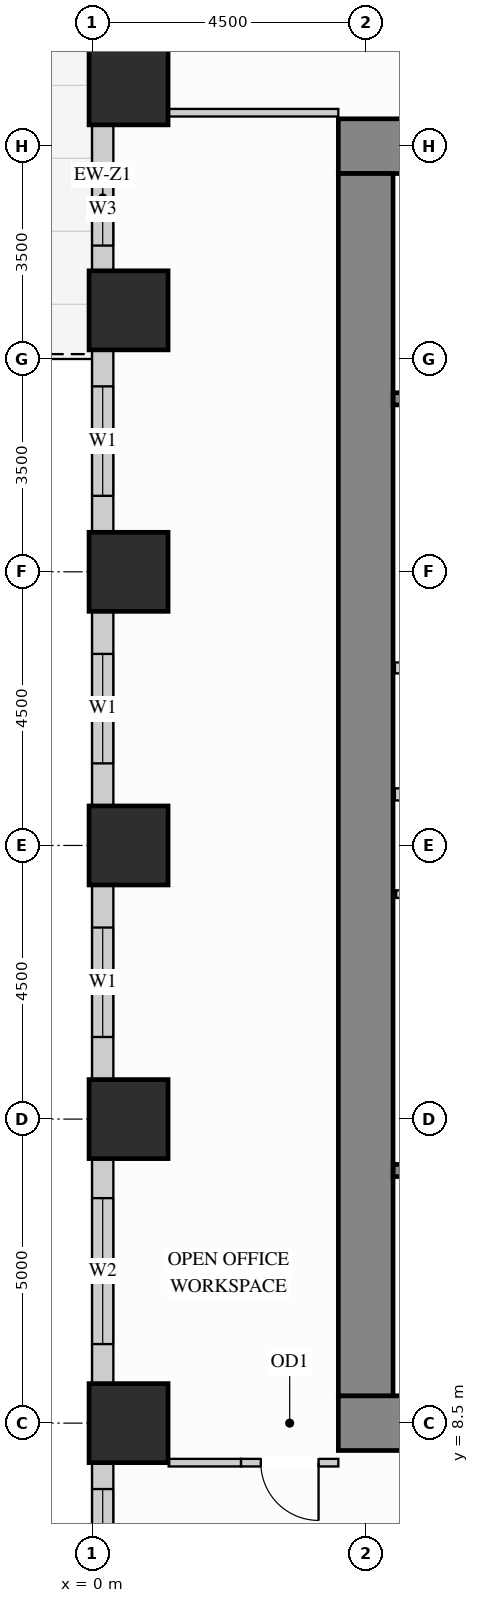
"""IFC4 building model, lengths in metres.
Left out: names, types, materials, properties, quantities, classifications, styles, units other than length and angle.
Written with IfcOpenShell. Run it as: python <this file> out.ifc"""

import sys

from ifc_helpers import new_model, si_unit, direction, frame, frame_2d, origin, origin_2d, place, context, subcontext, project, spatial, rectangle, extrude, source, transform, mapped, element, fill, save


model = new_model("IFC4")
c1 = context("Model", 3, precision=1e-05, world=origin(), true_north=direction((0.0, 1.0)))
c2 = subcontext(c1, "Body", "Model", "MODEL_VIEW")
j1 = project(units=[si_unit("LENGTHUNIT", "METRE"), si_unit("PLANEANGLEUNIT", "RADIAN")], contexts=[c1])
p1 = place(None, origin())
s1 = spatial("IfcSite", under=j1, at=p1, CompositionType="ELEMENT")
p2 = place(p1, origin())
s2 = spatial("IfcBuilding", under=s1, at=p2, CompositionType="ELEMENT")
p3 = place(p2, frame((0.0, 0.0, 22.5)))
s3 = spatial("IfcBuildingStorey", under=s2, at=p3, CompositionType="ELEMENT", Elevation=22.5)
m1 = source(origin(), c2, "Body", "SweptSolid", [
    extrude(rectangle(XDim=1.3, YDim=1.3, at=origin_2d()), origin(), (0.0, 0.0, 1.0), 3.38),
])
for number, where, z_axis, x_axis in (
    (1, (0.6, 13.5, 0.0), (0.0, 0.0, 1.0), (1.0, 0.0, 0.0)),
    (2, (0.6, 18.0, 0.0), (0.0, 0.0, 1.0), (1.0, 0.0, 0.0)),
    (3, (0.6, 22.5, 0.0), (0.0, 0.0, 1.0), (1.0, 0.0, 0.0)),
    (4, (0.6, 26.8, 0.0), (0.0, 0.0, 1.0), (1.0, 0.0, 0.0)),
    (5, (0.6, 30.5, 0.0), (0.0, 0.0, 1.0), (1.0, 0.0, 0.0)),
    (6, (0.6, 8.5, 0.0), (0.0, 0.0, 1.0), (1.0, 0.0, 0.0)),
):
    element("IfcColumn", number, at=place(p3, frame(where, z_axis=z_axis, x_axis=x_axis)), inside=s3, PredefinedType="COLUMN", context=c2, shape_type="MappedRepresentation", body=[
        mapped(m1, transform((0.0, 0.0, 0.0), x_axis=(1.0, 0.0, 0.0), y_axis=(0.0, 1.0, 0.0), z_axis=(0.0, 0.0, 1.0))),
    ])
m2 = source(origin(), c2, "Body", "SweptSolid", [
    extrude(rectangle(XDim=10.9, YDim=0.9, at=frame_2d((5.45, 0.0))), origin(), (0.0, 0.0, 1.0), 3.38),
])
for number, where, z_axis, x_axis in (
    (7, (4.05, 29.5, 0.0), (0.0, 0.0, 1.0), (1.0, 0.0, 0.0)),
    (8, (4.05, 8.5, 0.0), (0.0, 0.0, 1.0), (1.0, 0.0, 0.0)),
):
    element("IfcWall", number, at=place(p3, frame(where, z_axis=z_axis, x_axis=x_axis)), inside=s3, PredefinedType="SHEAR", context=c2, shape_type="MappedRepresentation", body=[
        mapped(m2, transform((0.0, 0.0, 0.0), x_axis=(1.0, 0.0, 0.0), y_axis=(0.0, 1.0, 0.0), z_axis=(0.0, 0.0, 1.0))),
    ])
m3 = source(origin(), c2, "Body", "SweptSolid", [
    extrude(rectangle(XDim=20.1, YDim=0.9, at=frame_2d((10.05, 0.0))), origin(), (0.0, 0.0, 1.0), 3.38),
])
p4 = place(p3, frame((4.5, 8.95, 0.0), z_axis=(0.0, 0.0, 1.0), x_axis=(0.0, 1.0, 0.0)))
e9 = element("IfcWall", 9, at=p4, inside=s3, PredefinedType="SHEAR", context=c2, shape_type="MappedRepresentation", body=[
    mapped(m3, transform((0.0, 0.0, 0.0), x_axis=(1.0, 0.0, 0.0), y_axis=(0.0, 1.0, 0.0), z_axis=(0.0, 0.0, 1.0))),
])
p5 = place(p3, frame((0.175, 29.852, 0.0), z_axis=(0.0, 0.0, 1.0), x_axis=(0.0, -1.0, 0.0)))
e10 = element("IfcWall", 10, at=p5, inside=s3, PredefinedType="SOLIDWALL", context=c2, shape_type="SweptSolid", body=[
    extrude(rectangle(XDim=2.404, YDim=0.35, at=frame_2d((1.202, 0.0))), origin(), (0.0, 0.0, 1.0), 2.51),
])
p6 = place(p5, frame((0.787, 0.0, 0.78)))
e11 = element("IfcOpeningElement", 11, at=p6, cuts=e10, PredefinedType="OPENING", context=c2, shape_type="SweptSolid", body=[
    extrude(rectangle(XDim=1.2, YDim=1.55, at=frame_2d((0.6, 0.775))), frame((0.0, 0.185, 0.0), z_axis=(0.0, -1.0, 0.0), x_axis=(1.0, 0.0, 0.0)), (0.0, 0.0, 1.0), 0.37),
])
p7 = place(p3, frame((0.175, 26.152, 0.0), z_axis=(0.0, 0.0, 1.0), x_axis=(0.0, -1.0, 0.0)))
e12 = element("IfcWall", 12, at=p7, inside=s3, PredefinedType="SOLIDWALL", context=c2, shape_type="SweptSolid", body=[
    extrude(rectangle(XDim=3.004, YDim=0.35, at=frame_2d((1.502, 0.0))), origin(), (0.0, 0.0, 1.0), 2.51),
])
p8 = place(p7, frame((0.602, 0.0, 0.78)))
e13 = element("IfcOpeningElement", 13, at=p8, cuts=e12, PredefinedType="OPENING", context=c2, shape_type="SweptSolid", body=[
    extrude(rectangle(XDim=1.8, YDim=1.55, at=frame_2d((0.9, 0.775))), frame((0.0, 0.185, 0.0), z_axis=(0.0, -1.0, 0.0), x_axis=(1.0, 0.0, 0.0)), (0.0, 0.0, 1.0), 0.37),
])
p9 = place(p3, frame((0.175, 21.852, 0.0), z_axis=(0.0, 0.0, 1.0), x_axis=(0.0, -1.0, 0.0)))
e14 = element("IfcWall", 14, at=p9, inside=s3, PredefinedType="SOLIDWALL", context=c2, shape_type="SweptSolid", body=[
    extrude(rectangle(XDim=3.204, YDim=0.35, at=frame_2d((1.602, 0.0))), origin(), (0.0, 0.0, 1.0), 2.51),
])
p10 = place(p9, frame((0.702, 0.0, 0.78)))
e15 = element("IfcOpeningElement", 15, at=p10, cuts=e14, PredefinedType="OPENING", context=c2, shape_type="SweptSolid", body=[
    extrude(rectangle(XDim=1.8, YDim=1.55, at=frame_2d((0.9, 0.775))), frame((0.0, 0.185, 0.0), z_axis=(0.0, -1.0, 0.0), x_axis=(1.0, 0.0, 0.0)), (0.0, 0.0, 1.0), 0.37),
])
p11 = place(p3, frame((0.175, 17.352, 0.0), z_axis=(0.0, 0.0, 1.0), x_axis=(0.0, -1.0, 0.0)))
e16 = element("IfcWall", 16, at=p11, inside=s3, PredefinedType="SOLIDWALL", context=c2, shape_type="SweptSolid", body=[
    extrude(rectangle(XDim=3.204, YDim=0.35, at=frame_2d((1.602, 0.0))), origin(), (0.0, 0.0, 1.0), 2.51),
])
p12 = place(p11, frame((0.702, 0.0, 0.78)))
e17 = element("IfcOpeningElement", 17, at=p12, cuts=e16, PredefinedType="OPENING", context=c2, shape_type="SweptSolid", body=[
    extrude(rectangle(XDim=1.8, YDim=1.55, at=frame_2d((0.9, 0.775))), frame((0.0, 0.185, 0.0), z_axis=(0.0, -1.0, 0.0), x_axis=(1.0, 0.0, 0.0)), (0.0, 0.0, 1.0), 0.37),
])
p13 = place(p3, frame((0.175, 12.852, 0.0), z_axis=(0.0, 0.0, 1.0), x_axis=(0.0, -1.0, 0.0)))
e18 = element("IfcWall", 18, at=p13, inside=s3, PredefinedType="SOLIDWALL", context=c2, shape_type="SweptSolid", body=[
    extrude(rectangle(XDim=3.704, YDim=0.35, at=frame_2d((1.852, 0.0))), origin(), (0.0, 0.0, 1.0), 2.51),
])
p14 = place(p13, frame((0.652, 0.0, 0.78)))
e19 = element("IfcOpeningElement", 19, at=p14, cuts=e18, PredefinedType="OPENING", context=c2, shape_type="SweptSolid", body=[
    extrude(rectangle(XDim=2.4, YDim=1.55, at=frame_2d((1.2, 0.775))), frame((0.0, 0.185, 0.0), z_axis=(0.0, -1.0, 0.0), x_axis=(1.0, 0.0, 0.0)), (0.0, 0.0, 1.0), 0.37),
])
p15 = place(p3, frame((0.175, 7.852, 0.0), z_axis=(0.0, 0.0, 1.0), x_axis=(0.0, -1.0, 0.0)))
e20 = element("IfcWall", 20, at=p15, inside=s3, PredefinedType="SOLIDWALL", context=c2, shape_type="SweptSolid", body=[
    extrude(rectangle(XDim=3.704, YDim=0.35, at=frame_2d((1.852, 0.0))), origin(), (0.0, 0.0, 1.0), 2.51),
])
p16 = place(p15, frame((0.436, 0.0, 0.78)))
e21 = element("IfcOpeningElement", 21, at=p16, cuts=e20, PredefinedType="OPENING", context=c2, shape_type="SweptSolid", body=[
    extrude(rectangle(XDim=2.4, YDim=1.55, at=frame_2d((1.2, 0.775))), frame((0.0, 0.185, 0.0), z_axis=(0.0, -1.0, 0.0), x_axis=(1.0, 0.0, 0.0)), (0.0, 0.0, 1.0), 0.37),
])
m4 = source(origin(), c2, "Body", "SweptSolid", [
    extrude(rectangle(XDim=2.17, YDim=0.18, at=frame_2d((1.085, 0.0))), origin(), (0.0, 0.0, 1.0), 3.365),
])
p17 = place(p3, frame((4.98, 20.92, 0.0), z_axis=(0.0, 0.0, 1.0), x_axis=(1.0, 0.0, 0.0)))
e22 = element("IfcWall", 22, at=p17, inside=s3, PredefinedType="PARTITIONING", context=c2, shape_type="MappedRepresentation", body=[
    mapped(m4, transform((0.0, 0.0, 0.0), x_axis=(1.0, 0.0, 0.0), y_axis=(0.0, 1.0, 0.0), z_axis=(0.0, 0.0, 1.0))),
])
p18 = place(p3, frame((5.0, 17.2, 0.0), z_axis=(0.0, 0.0, 1.0), x_axis=(1.0, 0.0, 0.0)))
e23 = element("IfcWall", 23, at=p18, inside=s3, PredefinedType="PARTITIONING", context=c2, shape_type="SweptSolid", body=[
    extrude(rectangle(XDim=2.4, YDim=0.125, at=frame_2d((1.2, 0.0))), origin(), (0.0, 0.0, 1.0), 3.365),
])
p19 = place(p18, frame((0.7, 0.0, 0.0)))
e24 = element("IfcOpeningElement", 24, at=p19, cuts=e23, PredefinedType="OPENING", context=c2, shape_type="SweptSolid", body=[
    extrude(rectangle(XDim=0.85, YDim=2.1, at=frame_2d((0.425, 1.05))), frame((0.0, 0.073, 0.0), z_axis=(0.0, -1.0, 0.0), x_axis=(1.0, 0.0, 0.0)), (0.0, 0.0, 1.0), 0.145),
])
m5 = source(origin(), c2, "Body", "SweptSolid", [
    extrude(rectangle(XDim=2.79, YDim=0.125, at=frame_2d((1.395, 0.0))), origin(), (0.0, 0.0, 1.0), 3.365),
])
p20 = place(p3, frame((1.26, 30.05, 0.0), z_axis=(0.0, 0.0, 1.0), x_axis=(1.0, 0.0, 0.0)))
e25 = element("IfcWall", 25, at=p20, inside=s3, PredefinedType="PARTITIONING", context=c2, shape_type="MappedRepresentation", body=[
    mapped(m5, transform((0.0, 0.0, 0.0), x_axis=(1.0, 0.0, 0.0), y_axis=(0.0, 1.0, 0.0), z_axis=(0.0, 0.0, 1.0))),
])
m6 = source(origin(), c2, "Body", "SweptSolid", [
    extrude(rectangle(XDim=1.19, YDim=0.125, at=frame_2d((0.595, 0.0))), origin(), (0.0, 0.0, 1.0), 3.365),
])
p21 = place(p3, frame((1.26, 7.85, 0.0), z_axis=(0.0, 0.0, 1.0), x_axis=(1.0, 0.0, 0.0)))
e26 = element("IfcWall", 26, at=p21, inside=s3, PredefinedType="PARTITIONING", context=c2, shape_type="MappedRepresentation", body=[
    mapped(m6, transform((0.0, 0.0, 0.0), x_axis=(1.0, 0.0, 0.0), y_axis=(0.0, 1.0, 0.0), z_axis=(0.0, 0.0, 1.0))),
])
p22 = place(p3, frame((2.45, 7.85, 0.0), z_axis=(0.0, 0.0, 1.0), x_axis=(1.0, 0.0, 0.0)))
e27 = element("IfcWall", 27, at=p22, inside=s3, PredefinedType="PARTITIONING", context=c2, shape_type="SweptSolid", body=[
    extrude(rectangle(XDim=1.6, YDim=0.125, at=frame_2d((0.8, 0.0))), origin(), (0.0, 0.0, 1.0), 3.365),
])
p23 = place(p22, frame((0.325, 0.0, 0.0)))
e28 = element("IfcOpeningElement", 28, at=p23, cuts=e27, PredefinedType="OPENING", context=c2, shape_type="SweptSolid", body=[
    extrude(rectangle(XDim=0.95, YDim=2.15, at=frame_2d((0.475, 1.075))), frame((0.0, 0.073, 0.0), z_axis=(0.0, -1.0, 0.0), x_axis=(1.0, 0.0, 0.0)), (0.0, 0.0, 1.0), 0.145),
])
m7 = source(origin(), c2, "Body", "SweptSolid", [
    extrude(rectangle(XDim=2.09, YDim=0.2, at=frame_2d((1.045, 0.0))), origin(), (0.0, 0.0, 1.0), 3.365),
])
p24 = place(p3, frame((4.98, 18.84, 0.0), z_axis=(0.0, 0.0, 1.0), x_axis=(1.0, 0.0, 0.0)))
e29 = element("IfcWall", 29, at=p24, inside=s3, PredefinedType="PARTITIONING", context=c2, shape_type="MappedRepresentation", body=[
    mapped(m7, transform((0.0, 0.0, 0.0), x_axis=(1.0, 0.0, 0.0), y_axis=(0.0, 1.0, 0.0), z_axis=(0.0, 0.0, 1.0))),
])
p25 = place(p3, frame((4.952, 12.655, 0.0), z_axis=(0.0, 0.0, 1.0), x_axis=(1.0, 0.0, 0.0)))
e30 = element("IfcWall", 30, at=p25, inside=s3, PredefinedType="SHEAR", context=c2, shape_type="SweptSolid", body=[
    extrude(rectangle(XDim=7.453, YDim=0.2, at=frame_2d((3.727, 0.0))), origin(), (0.0, 0.0, 1.0), 3.38),
])
p26 = place(p25, frame((0.4, 0.0, 0.0)))
e31 = element("IfcOpeningElement", 31, at=p26, cuts=e30, PredefinedType="OPENING", context=c2, shape_type="SweptSolid", body=[
    extrude(rectangle(XDim=1.1, YDim=2.15, at=frame_2d((0.55, 1.075))), frame((0.0, 0.11, 0.0), z_axis=(0.0, -1.0, 0.0), x_axis=(1.0, 0.0, 0.0)), (0.0, 0.0, 1.0), 0.22),
])
p27 = place(p3, frame((4.952, 25.345, 0.0), z_axis=(0.0, 0.0, 1.0), x_axis=(1.0, 0.0, 0.0)))
e32 = element("IfcWall", 32, at=p27, inside=s3, PredefinedType="SHEAR", context=c2, shape_type="SweptSolid", body=[
    extrude(rectangle(XDim=7.453, YDim=0.2, at=frame_2d((3.727, 0.0))), origin(), (0.0, 0.0, 1.0), 3.38),
])
p28 = place(p27, frame((0.4, 0.0, 0.0)))
e33 = element("IfcOpeningElement", 33, at=p28, cuts=e32, PredefinedType="OPENING", context=c2, shape_type="SweptSolid", body=[
    extrude(rectangle(XDim=1.1, YDim=2.15, at=frame_2d((0.55, 1.075))), frame((0.0, 0.11, 0.0), z_axis=(0.0, -1.0, 0.0), x_axis=(1.0, 0.0, 0.0)), (0.0, 0.0, 1.0), 0.22),
])
m8 = source(origin(), c2, "Body", "SweptSolid", [
    extrude(rectangle(XDim=0.95, YDim=2.15, at=frame_2d((0.475, 1.075))), frame((0.0, 0.025, 0.0), z_axis=(0.0, -1.0, 0.0), x_axis=(1.0, 0.0, 0.0)), (0.0, 0.0, 1.0), 0.05),
])
p29 = place(p23, origin())
e34 = element("IfcDoor", 34, at=p29, inside=s3, OperationType="SINGLE_SWING_RIGHT", PredefinedType="DOOR", context=c2, shape_type="MappedRepresentation", body=[
    mapped(m8, transform((0.0, 0.0, 0.0), x_axis=(1.0, 0.0, 0.0), y_axis=(0.0, 1.0, 0.0), z_axis=(0.0, 0.0, 1.0))),
])
fill(e28, e34)
m9 = source(origin(), c2, "Body", "SweptSolid", [
    extrude(rectangle(XDim=1.8, YDim=1.55, at=frame_2d((0.9, 0.775))), frame((0.0, 0.03, 0.0), z_axis=(0.0, -1.0, 0.0), x_axis=(1.0, 0.0, 0.0)), (0.0, 0.0, 1.0), 0.06),
])
p30 = place(p8, origin())
e35 = element("IfcWindow", 35, at=p30, inside=s3, PartitioningType="SINGLE_PANEL", PredefinedType="WINDOW", context=c2, shape_type="MappedRepresentation", body=[
    mapped(m9, transform((0.0, 0.0, 0.0), x_axis=(1.0, 0.0, 0.0), y_axis=(0.0, 1.0, 0.0), z_axis=(0.0, 0.0, 1.0))),
])
fill(e13, e35)
p31 = place(p10, origin())
e36 = element("IfcWindow", 36, at=p31, inside=s3, PartitioningType="SINGLE_PANEL", PredefinedType="WINDOW", context=c2, shape_type="MappedRepresentation", body=[
    mapped(m9, transform((0.0, 0.0, 0.0), x_axis=(1.0, 0.0, 0.0), y_axis=(0.0, 1.0, 0.0), z_axis=(0.0, 0.0, 1.0))),
])
fill(e15, e36)
p32 = place(p12, origin())
e37 = element("IfcWindow", 37, at=p32, inside=s3, PartitioningType="SINGLE_PANEL", PredefinedType="WINDOW", context=c2, shape_type="MappedRepresentation", body=[
    mapped(m9, transform((0.0, 0.0, 0.0), x_axis=(1.0, 0.0, 0.0), y_axis=(0.0, 1.0, 0.0), z_axis=(0.0, 0.0, 1.0))),
])
fill(e17, e37)
m10 = source(origin(), c2, "Body", "SweptSolid", [
    extrude(rectangle(XDim=2.4, YDim=1.55, at=frame_2d((1.2, 0.775))), frame((0.0, 0.03, 0.0), z_axis=(0.0, -1.0, 0.0), x_axis=(1.0, 0.0, 0.0)), (0.0, 0.0, 1.0), 0.06),
])
p33 = place(p14, origin())
e38 = element("IfcWindow", 38, at=p33, inside=s3, PartitioningType="SINGLE_PANEL", PredefinedType="WINDOW", context=c2, shape_type="MappedRepresentation", body=[
    mapped(m10, transform((0.0, 0.0, 0.0), x_axis=(1.0, 0.0, 0.0), y_axis=(0.0, 1.0, 0.0), z_axis=(0.0, 0.0, 1.0))),
])
fill(e19, e38)
p34 = place(p16, origin())
e39 = element("IfcWindow", 39, at=p34, inside=s3, PartitioningType="SINGLE_PANEL", PredefinedType="WINDOW", context=c2, shape_type="MappedRepresentation", body=[
    mapped(m10, transform((0.0, 0.0, 0.0), x_axis=(1.0, 0.0, 0.0), y_axis=(0.0, 1.0, 0.0), z_axis=(0.0, 0.0, 1.0))),
])
fill(e21, e39)
m11 = source(origin(), c2, "Body", "SweptSolid", [
    extrude(rectangle(XDim=1.2, YDim=1.55, at=frame_2d((0.6, 0.775))), frame((0.0, 0.03, 0.0), z_axis=(0.0, -1.0, 0.0), x_axis=(1.0, 0.0, 0.0)), (0.0, 0.0, 1.0), 0.06),
])
p35 = place(p6, origin())
e40 = element("IfcWindow", 40, at=p35, inside=s3, PartitioningType="SINGLE_PANEL", PredefinedType="WINDOW", context=c2, shape_type="MappedRepresentation", body=[
    mapped(m11, transform((0.0, 0.0, 0.0), x_axis=(1.0, 0.0, 0.0), y_axis=(0.0, 1.0, 0.0), z_axis=(0.0, 0.0, 1.0))),
])
fill(e11, e40)
save(model, sys.argv[1])
